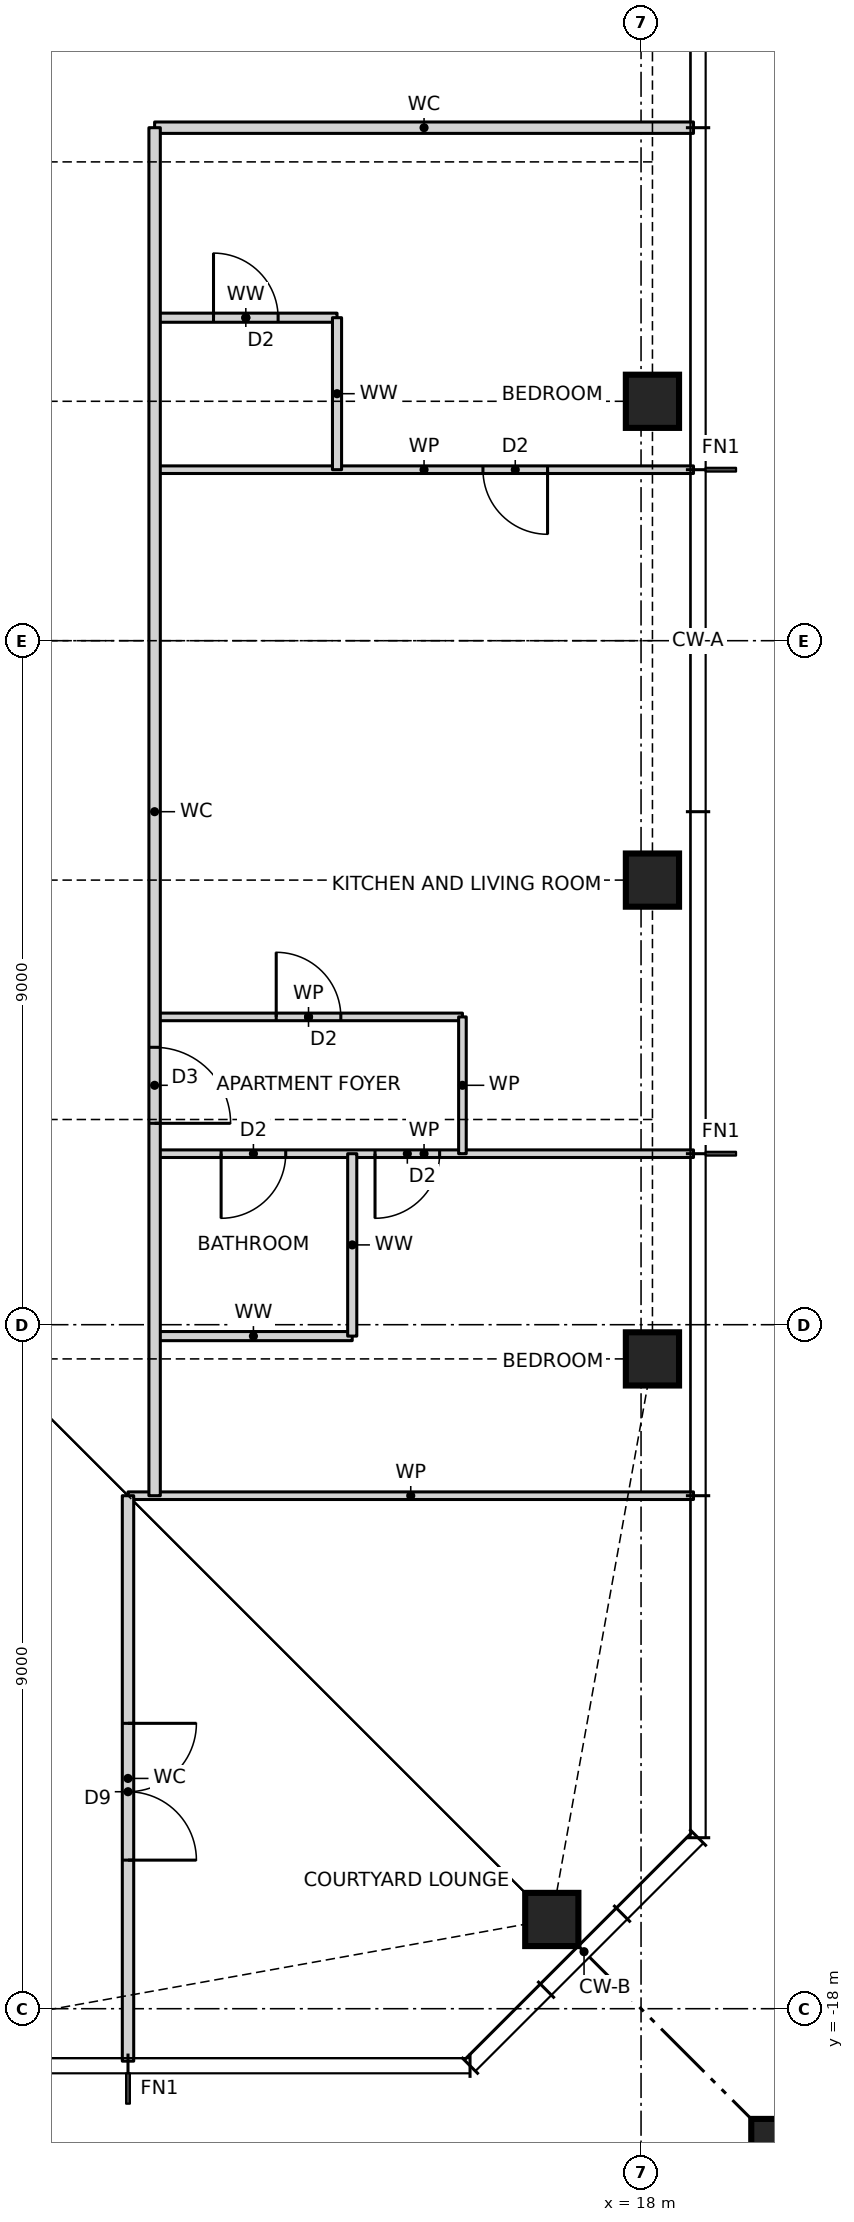
"""IFC4 building model, lengths in metres.
Left out: names, types, materials, properties, quantities, classifications, styles, units other than length and angle.
Written with IfcOpenShell. Run it as: python <this file> out.ifc"""

import sys

from ifc_helpers import new_model, si_unit, direction, frame, frame_2d, origin, origin_2d, place, context, subcontext, project, spatial, rectangle, hollow_rectangle, i_section, extrude, element, fill, save


model = new_model("IFC4")
c1 = context("Model", 3, precision=1e-05, world=origin(), true_north=direction((0.0, 1.0)))
c2 = subcontext(c1, "Body", "Model", "MODEL_VIEW")
j1 = project(units=[si_unit("LENGTHUNIT", "METRE"), si_unit("PLANEANGLEUNIT", "RADIAN")], contexts=[c1])
p1 = place(None, origin())
s1 = spatial("IfcSite", under=j1, at=p1, CompositionType="ELEMENT")
p2 = place(p1, origin())
s2 = spatial("IfcBuilding", under=s1, at=p2, CompositionType="ELEMENT")
p3 = place(p2, frame((0.0, 0.0, 174.0)))
s3 = spatial("IfcBuildingStorey", under=s2, at=p3, CompositionType="ELEMENT", Elevation=174.0)
for number, where, z_axis, x_axis in (
    (1, (16.826, -16.826, 0.0), (0.0, 0.0, 1.0), (1.0, 0.0, 0.0)),
    (2, (18.15, -9.45, 0.0), (0.0, 0.0, 1.0), (1.0, 0.0, 0.0)),
    (3, (18.15, -3.15, 0.0), (0.0, 0.0, 1.0), (1.0, 0.0, 0.0)),
    (4, (18.15, 3.15, 0.0), (0.0, 0.0, 1.0), (1.0, 0.0, 0.0)),
):
    element("IfcColumn", number, at=place(p3, frame(where, z_axis=z_axis, x_axis=x_axis)), inside=s3, PredefinedType="COLUMN", context=c2, shape_type="SweptSolid", body=[
        extrude(hollow_rectangle(XDim=0.7, YDim=0.7, WallThickness=0.06, at=origin_2d()), origin(), (0.0, 0.0, 1.0), 3.5),
    ])
p4 = place(p3, frame((21.65, -21.65, 0.0), z_axis=(0.0, 0.0, 1.0), x_axis=(1.0, 0.0, 0.0)))
e5 = element("IfcColumn", 5, at=p4, inside=s3, PredefinedType="COLUMN", context=c2, shape_type="SweptSolid", body=[
    extrude(rectangle(XDim=4.4, YDim=4.4, at=origin_2d()), origin(), (0.0, 0.0, 1.0), 3.5),
    extrude(i_section(OverallWidth=0.478, OverallDepth=0.599, WebThickness=0.1, FlangeThickness=0.14, at=origin_2d()), origin(), (0.0, 0.0, 1.0), 3.5),
])
p5 = place(p3, frame((11.25, -11.25, 0.0), z_axis=(0.0, 0.0, 1.0), x_axis=(1.0, 0.0, 0.0)))
e6 = element("IfcWall", 6, at=p5, inside=s3, PredefinedType="PARTITIONING", context=c2, shape_type="SweptSolid", body=[
    extrude(rectangle(XDim=7.44, YDim=0.1, at=frame_2d((3.72, 0.0))), origin(), (0.0, 0.0, 1.0), 3.27),
])
p6 = place(p3, frame((11.6, -9.15, 0.0), z_axis=(0.0, 0.0, 1.0), x_axis=(1.0, 0.0, 0.0)))
e7 = element("IfcWall", 7, at=p6, inside=s3, PredefinedType="PARTITIONING", context=c2, shape_type="SweptSolid", body=[
    extrude(rectangle(XDim=2.6, YDim=0.12, at=frame_2d((1.3, 0.0))), origin(), (0.0, 0.0, 1.0), 3.27),
])
p7 = place(p3, frame((11.6, -6.75, 0.0), z_axis=(0.0, 0.0, 1.0), x_axis=(1.0, 0.0, 0.0)))
e8 = element("IfcWall", 8, at=p7, inside=s3, PredefinedType="PARTITIONING", context=c2, shape_type="SweptSolid", body=[
    extrude(rectangle(XDim=7.09, YDim=0.1, at=frame_2d((3.545, 0.0))), origin(), (0.0, 0.0, 1.0), 3.27),
])
p8 = place(p7, frame((2.9, 0.0, 0.0)))
e9 = element("IfcOpeningElement", 9, at=p8, cuts=e8, PredefinedType="OPENING", context=c2, shape_type="SweptSolid", body=[
    extrude(rectangle(XDim=0.85, YDim=2.1, at=frame_2d((0.425, 1.05))), frame((0.0, 0.06, 0.0), z_axis=(0.0, -1.0, 0.0), x_axis=(1.0, 0.0, 0.0)), (0.0, 0.0, 1.0), 0.12),
])
p9 = place(p7, frame((0.875, 0.0, 0.0)))
e10 = element("IfcOpeningElement", 10, at=p9, cuts=e8, PredefinedType="OPENING", context=c2, shape_type="SweptSolid", body=[
    extrude(rectangle(XDim=0.85, YDim=2.1, at=frame_2d((0.425, 1.05))), frame((0.0, 0.06, 0.0), z_axis=(0.0, -1.0, 0.0), x_axis=(1.0, 0.0, 0.0)), (0.0, 0.0, 1.0), 0.12),
])
p10 = place(p3, frame((11.6, -4.95, 0.0), z_axis=(0.0, 0.0, 1.0), x_axis=(1.0, 0.0, 0.0)))
e11 = element("IfcWall", 11, at=p10, inside=s3, PredefinedType="PARTITIONING", context=c2, shape_type="SweptSolid", body=[
    extrude(rectangle(XDim=4.05, YDim=0.1, at=frame_2d((2.025, 0.0))), origin(), (0.0, 0.0, 1.0), 3.27),
])
p11 = place(p10, frame((1.6, 0.0, 0.0)))
e12 = element("IfcOpeningElement", 12, at=p11, cuts=e11, PredefinedType="OPENING", context=c2, shape_type="SweptSolid", body=[
    extrude(rectangle(XDim=0.85, YDim=2.1, at=frame_2d((0.425, 1.05))), frame((0.0, 0.06, 0.0), z_axis=(0.0, -1.0, 0.0), x_axis=(1.0, 0.0, 0.0)), (0.0, 0.0, 1.0), 0.12),
])
p12 = place(p3, frame((11.6, 2.25, 0.0), z_axis=(0.0, 0.0, 1.0), x_axis=(1.0, 0.0, 0.0)))
e13 = element("IfcWall", 13, at=p12, inside=s3, PredefinedType="PARTITIONING", context=c2, shape_type="SweptSolid", body=[
    extrude(rectangle(XDim=7.09, YDim=0.1, at=frame_2d((3.545, 0.0))), origin(), (0.0, 0.0, 1.0), 3.27),
])
p13 = place(p12, frame((4.32, 0.0, 0.0)))
e14 = element("IfcOpeningElement", 14, at=p13, cuts=e13, PredefinedType="OPENING", context=c2, shape_type="SweptSolid", body=[
    extrude(rectangle(XDim=0.85, YDim=2.1, at=frame_2d((0.425, 1.05))), frame((0.0, 0.06, 0.0), z_axis=(0.0, -1.0, 0.0), x_axis=(1.0, 0.0, 0.0)), (0.0, 0.0, 1.0), 0.12),
])
p14 = place(p3, frame((11.6, 4.25, 0.0), z_axis=(0.0, 0.0, 1.0), x_axis=(1.0, 0.0, 0.0)))
e15 = element("IfcWall", 15, at=p14, inside=s3, PredefinedType="PARTITIONING", context=c2, shape_type="SweptSolid", body=[
    extrude(rectangle(XDim=2.4, YDim=0.12, at=frame_2d((1.2, 0.0))), origin(), (0.0, 0.0, 1.0), 3.27),
])
p15 = place(p14, frame((0.775, 0.0, 0.0)))
e16 = element("IfcOpeningElement", 16, at=p15, cuts=e15, PredefinedType="OPENING", context=c2, shape_type="SweptSolid", body=[
    extrude(rectangle(XDim=0.85, YDim=2.1, at=frame_2d((0.425, 1.05))), frame((0.0, 0.07, 0.0), z_axis=(0.0, -1.0, 0.0), x_axis=(1.0, 0.0, 0.0)), (0.0, 0.0, 1.0), 0.14),
])
p16 = place(p3, frame((11.6, 6.75, 0.0), z_axis=(0.0, 0.0, 1.0), x_axis=(1.0, 0.0, 0.0)))
e17 = element("IfcWall", 17, at=p16, inside=s3, PredefinedType="PARTITIONING", context=c2, shape_type="SweptSolid", body=[
    extrude(rectangle(XDim=7.09, YDim=0.15, at=frame_2d((3.545, 0.0))), origin(), (0.0, 0.0, 1.0), 3.27),
])
p17 = place(p3, frame((15.65, -6.75, 0.0), z_axis=(0.0, 0.0, 1.0), x_axis=(0.0, 1.0, 0.0)))
e18 = element("IfcWall", 18, at=p17, inside=s3, PredefinedType="PARTITIONING", context=c2, shape_type="SweptSolid", body=[
    extrude(rectangle(XDim=1.8, YDim=0.1, at=frame_2d((0.9, 0.0))), origin(), (0.0, 0.0, 1.0), 3.27),
])
p18 = place(p3, frame((14.2, -9.15, 0.0), z_axis=(0.0, 0.0, 1.0), x_axis=(0.0, 1.0, 0.0)))
e19 = element("IfcWall", 19, at=p18, inside=s3, PredefinedType="PARTITIONING", context=c2, shape_type="SweptSolid", body=[
    extrude(rectangle(XDim=2.4, YDim=0.12, at=frame_2d((1.2, 0.0))), origin(), (0.0, 0.0, 1.0), 3.27),
])
p19 = place(p3, frame((14.0, 2.25, 0.0), z_axis=(0.0, 0.0, 1.0), x_axis=(0.0, 1.0, 0.0)))
e20 = element("IfcWall", 20, at=p19, inside=s3, PredefinedType="PARTITIONING", context=c2, shape_type="SweptSolid", body=[
    extrude(rectangle(XDim=2.0, YDim=0.12, at=frame_2d((1.0, 0.0))), origin(), (0.0, 0.0, 1.0), 3.27),
])
p20 = place(p3, frame((11.6, -11.25, 0.0), z_axis=(0.0, 0.0, 1.0), x_axis=(0.0, 1.0, 0.0)))
e21 = element("IfcWall", 21, at=p20, inside=s3, PredefinedType="PARTITIONING", context=c2, shape_type="SweptSolid", body=[
    extrude(rectangle(XDim=18.0, YDim=0.15, at=frame_2d((9.0, 0.0))), origin(), (0.0, 0.0, 1.0), 3.27),
])
p21 = place(p20, frame((4.9, 0.0, 0.0)))
e22 = element("IfcOpeningElement", 22, at=p21, cuts=e21, PredefinedType="OPENING", context=c2, shape_type="SweptSolid", body=[
    extrude(rectangle(XDim=1.0, YDim=2.1, at=frame_2d((0.5, 1.05))), frame((0.0, 0.085, 0.0), z_axis=(0.0, -1.0, 0.0), x_axis=(1.0, 0.0, 0.0)), (0.0, 0.0, 1.0), 0.17),
])
p22 = place(p3, frame((11.25, -18.69, 0.0), z_axis=(0.0, 0.0, 1.0), x_axis=(0.0, 1.0, 0.0)))
e23 = element("IfcWall", 23, at=p22, inside=s3, PredefinedType="PARTITIONING", context=c2, shape_type="SweptSolid", body=[
    extrude(rectangle(XDim=7.44, YDim=0.15, at=frame_2d((3.72, 0.0))), origin(), (0.0, 0.0, 1.0), 3.27),
])
p23 = place(p22, frame((2.645, 0.0, 0.0)))
e24 = element("IfcOpeningElement", 24, at=p23, cuts=e23, PredefinedType="OPENING", context=c2, shape_type="SweptSolid", body=[
    extrude(rectangle(XDim=1.8, YDim=2.1, at=frame_2d((0.9, 1.05))), frame((0.0, 0.085, 0.0), z_axis=(0.0, -1.0, 0.0), x_axis=(1.0, 0.0, 0.0)), (0.0, 0.0, 1.0), 0.17),
])
p24 = place(p21, frame((1.0, 0.0, 0.0), z_axis=(0.0, 0.0, 1.0), x_axis=(-1.0, 0.0, 0.0)))
e25 = element("IfcDoor", 25, at=p24, inside=s3, OperationType="SINGLE_SWING_RIGHT", PredefinedType="DOOR", context=c2, shape_type="SweptSolid", body=[
    extrude(rectangle(XDim=1.0, YDim=2.1, at=frame_2d((0.5, 1.05))), frame((0.0, 0.025, 0.0), z_axis=(0.0, -1.0, 0.0), x_axis=(1.0, 0.0, 0.0)), (0.0, 0.0, 1.0), 0.05),
])
fill(e22, e25)
p25 = place(p11, origin())
e26 = element("IfcDoor", 26, at=p25, inside=s3, OperationType="SINGLE_SWING_LEFT", PredefinedType="DOOR", context=c2, shape_type="SweptSolid", body=[
    extrude(rectangle(XDim=0.85, YDim=2.1, at=frame_2d((0.425, 1.05))), frame((0.0, 0.025, 0.0), z_axis=(0.0, -1.0, 0.0), x_axis=(1.0, 0.0, 0.0)), (0.0, 0.0, 1.0), 0.05),
])
fill(e12, e26)
p26 = place(p8, frame((0.85, 0.0, 0.0), z_axis=(0.0, 0.0, 1.0), x_axis=(-1.0, 0.0, 0.0)))
e27 = element("IfcDoor", 27, at=p26, inside=s3, OperationType="SINGLE_SWING_RIGHT", PredefinedType="DOOR", context=c2, shape_type="SweptSolid", body=[
    extrude(rectangle(XDim=0.85, YDim=2.1, at=frame_2d((0.425, 1.05))), frame((0.0, 0.025, 0.0), z_axis=(0.0, -1.0, 0.0), x_axis=(1.0, 0.0, 0.0)), (0.0, 0.0, 1.0), 0.05),
])
fill(e9, e27)
p27 = place(p9, frame((0.85, 0.0, 0.0), z_axis=(0.0, 0.0, 1.0), x_axis=(-1.0, 0.0, 0.0)))
e28 = element("IfcDoor", 28, at=p27, inside=s3, OperationType="SINGLE_SWING_RIGHT", PredefinedType="DOOR", context=c2, shape_type="SweptSolid", body=[
    extrude(rectangle(XDim=0.85, YDim=2.1, at=frame_2d((0.425, 1.05))), frame((0.0, 0.025, 0.0), z_axis=(0.0, -1.0, 0.0), x_axis=(1.0, 0.0, 0.0)), (0.0, 0.0, 1.0), 0.05),
])
fill(e10, e28)
p28 = place(p13, frame((0.85, 0.0, 0.0), z_axis=(0.0, 0.0, 1.0), x_axis=(-1.0, 0.0, 0.0)))
e29 = element("IfcDoor", 29, at=p28, inside=s3, OperationType="SINGLE_SWING_LEFT", PredefinedType="DOOR", context=c2, shape_type="SweptSolid", body=[
    extrude(rectangle(XDim=0.85, YDim=2.1, at=frame_2d((0.425, 1.05))), frame((0.0, 0.025, 0.0), z_axis=(0.0, -1.0, 0.0), x_axis=(1.0, 0.0, 0.0)), (0.0, 0.0, 1.0), 0.05),
])
fill(e14, e29)
p29 = place(p15, origin())
e30 = element("IfcDoor", 30, at=p29, inside=s3, OperationType="SINGLE_SWING_LEFT", PredefinedType="DOOR", context=c2, shape_type="SweptSolid", body=[
    extrude(rectangle(XDim=0.85, YDim=2.1, at=frame_2d((0.425, 1.05))), frame((0.0, 0.025, 0.0), z_axis=(0.0, -1.0, 0.0), x_axis=(1.0, 0.0, 0.0)), (0.0, 0.0, 1.0), 0.05),
])
fill(e16, e30)
p30 = place(p23, frame((1.8, 0.0, 0.0), z_axis=(0.0, 0.0, 1.0), x_axis=(-1.0, 0.0, 0.0)))
e31 = element("IfcDoor", 31, at=p30, inside=s3, OperationType="DOUBLE_DOOR_SINGLE_SWING", PredefinedType="DOOR", context=c2, shape_type="SweptSolid", body=[
    extrude(rectangle(XDim=1.8, YDim=2.1, at=frame_2d((0.9, 1.05))), frame((0.0, 0.025, 0.0), z_axis=(0.0, -1.0, 0.0), x_axis=(1.0, 0.0, 0.0)), (0.0, 0.0, 1.0), 0.05),
])
fill(e24, e31)
save(model, sys.argv[1])
